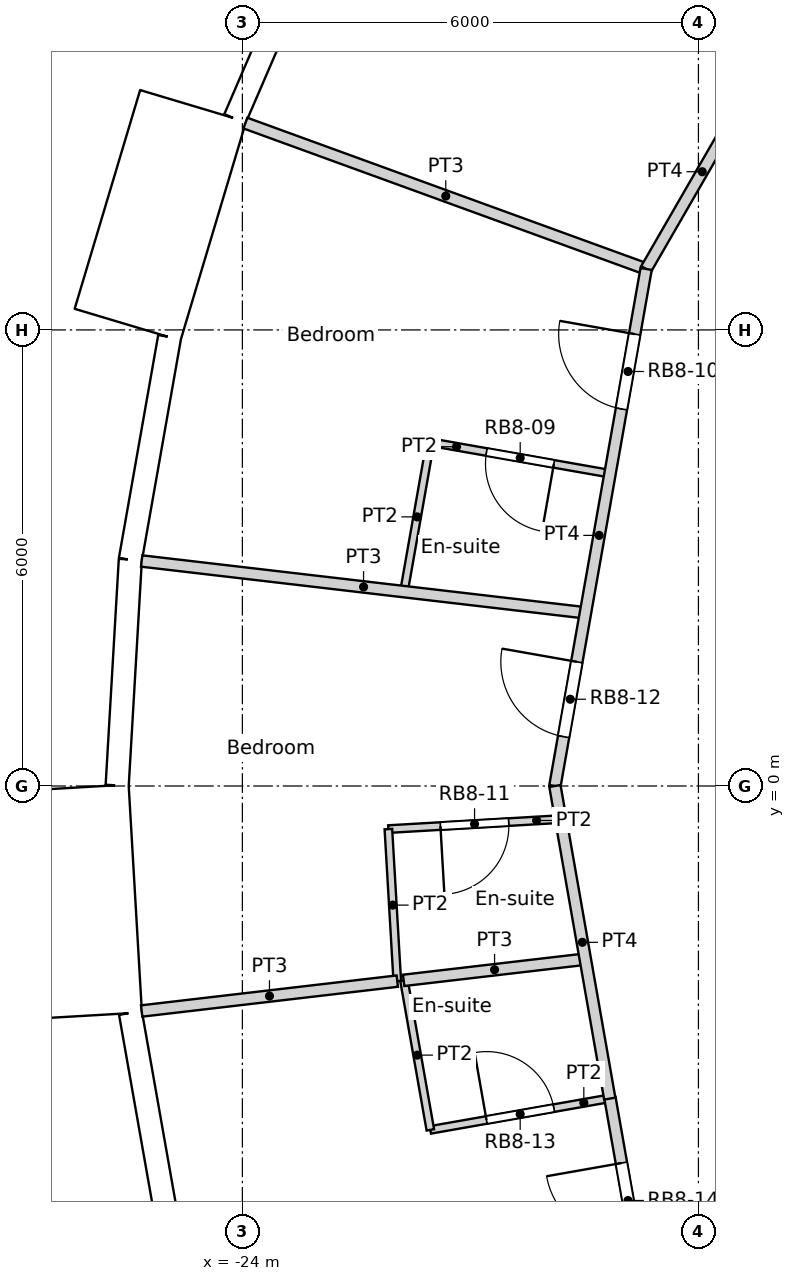
"""IFC4 building model, lengths in metres.
Left out: names, types, materials, properties, quantities, classifications, styles, units other than length and angle.
Written with IfcOpenShell. Run it as: python <this file> out.ifc"""

import sys

from ifc_helpers import new_model, si_unit, direction, frame, frame_2d, origin, origin_2d, place, context, subcontext, project, spatial, rectangle, circle, extrude, element, fill, save


model = new_model("IFC4")
c1 = context("Model", 3, precision=1e-05, world=origin(), true_north=direction((0.0, 1.0)))
c2 = subcontext(c1, "Body", "Model", "MODEL_VIEW")
j1 = project(units=[si_unit("LENGTHUNIT", "METRE"), si_unit("PLANEANGLEUNIT", "RADIAN")], contexts=[c1])
p1 = place(None, origin())
s1 = spatial("IfcSite", under=j1, at=p1, CompositionType="ELEMENT")
p2 = place(p1, origin())
s2 = spatial("IfcBuilding", under=s1, at=p2, CompositionType="ELEMENT")
p3 = place(p2, frame((0.0, 0.0, 201.6)))
s3 = spatial("IfcBuildingStorey", under=s2, at=p3, CompositionType="ELEMENT", Elevation=201.6)
for number, where, z_axis, x_axis in (
    (1, (-23.067, 8.396, 0.0), (0.0, 0.0, 1.0), (1.0, 0.0, 0.0)),
    (2, (-24.382, 2.85, 0.0), (0.0, 0.0, 1.0), (1.0, 0.0, 0.0)),
    (3, (-24.382, -2.85, 0.0), (0.0, 0.0, 1.0), (1.0, 0.0, 0.0)),
):
    element("IfcColumn", number, at=place(p3, frame(where, z_axis=z_axis, x_axis=x_axis)), inside=s3, PredefinedType="COLUMN", context=c2, shape_type="SweptSolid", body=[
        extrude(circle(Radius=0.6, at=origin_2d()), origin(), (0.0, 0.0, 1.0), 3.6),
    ])
for number, where, z_axis, x_axis in (
    (4, (-18.612, 2.805, 0.0), (0.0, 0.0, 1.0), (1.0, 0.0, 0.0)),
    (5, (-18.612, -2.805, 0.0), (0.0, 0.0, 1.0), (1.0, 0.0, 0.0)),
):
    element("IfcColumn", number, at=place(p3, frame(where, z_axis=z_axis, x_axis=x_axis)), inside=s3, PredefinedType="COLUMN", context=c2, shape_type="SweptSolid", body=[
        extrude(circle(Radius=0.65, at=origin_2d()), origin(), (0.0, 0.0, 1.0), 3.6),
    ])
p4 = place(p3, frame((-22.919, 11.51, 0.0), z_axis=(0.0, 0.0, 1.0), x_axis=(-0.396078892785, -0.918216483565, 0.0)))
e6 = element("IfcWall", 6, at=p4, inside=s3, PredefinedType="SOLIDWALL", context=c2, shape_type="SweptSolid", body=[
    extrude(rectangle(XDim=2.973, YDim=0.3, at=frame_2d((1.486, 0.0))), origin(), (0.0, 0.0, 1.0), 3.3),
])
p5 = place(p4, frame((1.486, 0.0, 1.55)))
e7 = element("IfcOpeningElement", 7, at=p5, cuts=e6, PredefinedType="OPENING", context=c2, shape_type="SweptSolid", body=[
    extrude(circle(Radius=0.9, at=origin_2d()), frame((0.0, 0.16, 0.0), z_axis=(0.0, -1.0, 0.0), x_axis=(1.0, 0.0, 0.0)), (0.0, 0.0, 1.0), 0.32),
])
p6 = place(p3, frame((-24.649, 8.945, -0.3), z_axis=(0.0, 0.0, 1.0), x_axis=(-0.286780420304, -0.957996341606, 0.0)))
e8 = element("IfcWall", 8, at=p6, inside=s3, PredefinedType="ELEMENTEDWALL", context=c2, shape_type="SweptSolid", body=[
    extrude(rectangle(XDim=3.0, YDim=1.45, at=frame_2d((1.5, 0.0))), origin(), (0.0, 0.0, 1.0), 3.6),
])
p7 = place(p6, frame((1.5, 0.0, 1.85)))
e9 = element("IfcOpeningElement", 9, at=p7, cuts=e8, PredefinedType="OPENING", context=c2, shape_type="SweptSolid", body=[
    extrude(circle(Radius=0.9, at=origin_2d()), frame((0.0, 0.735, 0.0), z_axis=(0.0, -1.0, 0.0), x_axis=(1.0, 0.0, 0.0)), (0.0, 0.0, 1.0), 1.47),
])
p8 = place(p3, frame((-24.958, 5.905, 0.0), z_axis=(0.0, 0.0, 1.0), x_axis=(-0.173686952598, -0.984800915159, 0.0)))
e10 = element("IfcWall", 10, at=p8, inside=s3, PredefinedType="SOLIDWALL", context=c2, shape_type="SweptSolid", body=[
    extrude(rectangle(XDim=2.973, YDim=0.3, at=frame_2d((1.486, 0.0))), origin(), (0.0, 0.0, 1.0), 3.3),
])
p9 = place(p8, frame((1.486, 0.0, 1.55)))
e11 = element("IfcOpeningElement", 11, at=p9, cuts=e10, PredefinedType="OPENING", context=c2, shape_type="SweptSolid", body=[
    extrude(circle(Radius=0.9, at=origin_2d()), frame((0.0, 0.16, 0.0), z_axis=(0.0, -1.0, 0.0), x_axis=(1.0, 0.0, 0.0)), (0.0, 0.0, 1.0), 0.32),
])
p10 = place(p3, frame((-25.474, 2.978, 0.0), z_axis=(0.0, 0.0, 1.0), x_axis=(-0.058139540521, -0.998308466271, 0.0)))
e12 = element("IfcWall", 12, at=p10, inside=s3, PredefinedType="SOLIDWALL", context=c2, shape_type="SweptSolid", body=[
    extrude(rectangle(XDim=2.973, YDim=0.3, at=frame_2d((1.487, 0.0))), origin(), (0.0, 0.0, 1.0), 3.3),
])
p11 = place(p10, frame((1.486, 0.0, 1.55)))
e13 = element("IfcOpeningElement", 13, at=p11, cuts=e12, PredefinedType="OPENING", context=c2, shape_type="SweptSolid", body=[
    extrude(circle(Radius=0.9, at=origin_2d()), frame((0.0, 0.16, 0.0), z_axis=(0.0, -1.0, 0.0), x_axis=(1.0, 0.0, 0.0)), (0.0, 0.0, 1.0), 0.32),
])
p12 = place(p3, frame((-26.222, -0.025, -0.3), z_axis=(0.0, 0.0, 1.0), x_axis=(0.058106596105, -0.998310384344, 0.0)))
e14 = element("IfcWall", 14, at=p12, inside=s3, PredefinedType="ELEMENTEDWALL", context=c2, shape_type="SweptSolid", body=[
    extrude(rectangle(XDim=3.0, YDim=1.45, at=frame_2d((1.5, 0.0))), origin(), (0.0, 0.0, 1.0), 3.6),
])
p13 = place(p12, frame((1.5, 0.0, 1.85)))
e15 = element("IfcOpeningElement", 15, at=p13, cuts=e14, PredefinedType="OPENING", context=c2, shape_type="SweptSolid", body=[
    extrude(circle(Radius=0.9, at=origin_2d()), frame((0.0, 0.735, 0.0), z_axis=(0.0, -1.0, 0.0), x_axis=(1.0, 0.0, 0.0)), (0.0, 0.0, 1.0), 1.47),
])
p14 = place(p3, frame((-25.472, -2.987, 0.0), z_axis=(0.0, 0.0, 1.0), x_axis=(0.173686952598, -0.984800915159, 0.0)))
e16 = element("IfcWall", 16, at=p14, inside=s3, PredefinedType="SOLIDWALL", context=c2, shape_type="SweptSolid", body=[
    extrude(rectangle(XDim=2.973, YDim=0.3, at=frame_2d((1.486, 0.0))), origin(), (0.0, 0.0, 1.0), 3.3),
])
p15 = place(p14, frame((1.486, 0.0, 1.55)))
e17 = element("IfcOpeningElement", 17, at=p15, cuts=e16, PredefinedType="OPENING", context=c2, shape_type="SweptSolid", body=[
    extrude(circle(Radius=0.9, at=origin_2d()), frame((0.0, 0.16, 0.0), z_axis=(0.0, -1.0, 0.0), x_axis=(1.0, 0.0, 0.0)), (0.0, 0.0, 1.0), 0.32),
])
p16 = place(p3, frame((-18.688, 6.802, 0.0), z_axis=(0.0, 0.0, 1.0), x_axis=(0.499914202267, 0.866074933462, 0.0)))
e18 = element("IfcWall", 18, at=p16, inside=s3, PredefinedType="PARTITIONING", context=c2, shape_type="SweptSolid", body=[
    extrude(rectangle(XDim=6.907, YDim=0.15, at=frame_2d((3.454, 0.0))), origin(), (0.0, 0.0, 1.0), 3.3),
])
p17 = place(p16, frame((3.004, 0.0, 0.0)))
e19 = element("IfcOpeningElement", 19, at=p17, cuts=e18, PredefinedType="OPENING", context=c2, shape_type="SweptSolid", body=[
    extrude(rectangle(XDim=1.8, YDim=2.1, at=frame_2d((0.9, 1.05))), frame((0.0, 0.075, 0.0), z_axis=(0.0, -1.0, 0.0), x_axis=(1.0, 0.0, 0.0)), (0.0, 0.0, 1.0), 0.15),
])
p18 = place(p3, frame((-19.888, 0.0, 0.0), z_axis=(0.0, 0.0, 1.0), x_axis=(0.173763153374, 0.984787472772, 0.0)))
e20 = element("IfcWall", 20, at=p18, inside=s3, PredefinedType="PARTITIONING", context=c2, shape_type="SweptSolid", body=[
    extrude(rectangle(XDim=6.907, YDim=0.15, at=frame_2d((3.454, 0.0))), origin(), (0.0, 0.0, 1.0), 3.3),
])
p19 = place(p18, frame((5.037, 0.0, 0.0)))
e21 = element("IfcOpeningElement", 21, at=p19, cuts=e20, PredefinedType="OPENING", context=c2, shape_type="SweptSolid", body=[
    extrude(rectangle(XDim=1.0, YDim=2.1, at=frame_2d((0.5, 1.05))), frame((0.0, 0.075, 0.0), z_axis=(0.0, -1.0, 0.0), x_axis=(1.0, 0.0, 0.0)), (0.0, 0.0, 1.0), 0.15),
])
p20 = place(p18, frame((0.659, 0.0, 0.0)))
e22 = element("IfcOpeningElement", 22, at=p20, cuts=e20, PredefinedType="OPENING", context=c2, shape_type="SweptSolid", body=[
    extrude(rectangle(XDim=1.0, YDim=2.1, at=frame_2d((0.5, 1.05))), frame((0.0, 0.075, 0.0), z_axis=(0.0, -1.0, 0.0), x_axis=(1.0, 0.0, 0.0)), (0.0, 0.0, 1.0), 0.15),
])
p21 = place(p3, frame((-19.888, 0.0, 0.0), z_axis=(0.0, 0.0, 1.0), x_axis=(0.1727845501, -0.984959643461, 0.0)))
e23 = element("IfcWall", 23, at=p21, inside=s3, PredefinedType="PARTITIONING", context=c2, shape_type="SweptSolid", body=[
    extrude(rectangle(XDim=4.175, YDim=0.15, at=frame_2d((2.088, 0.0))), origin(), (0.0, 0.0, 1.0), 3.3),
])
p22 = place(p3, frame((-19.164, -4.104, 0.0), z_axis=(0.0, 0.0, 1.0), x_axis=(0.173770083029, -0.984786250028, 0.0)))
e24 = element("IfcWall", 24, at=p22, inside=s3, PredefinedType="PARTITIONING", context=c2, shape_type="SweptSolid", body=[
    extrude(rectangle(XDim=2.74, YDim=0.15, at=frame_2d((1.37, 0.0))), origin(), (0.0, 0.0, 1.0), 3.3),
])
p23 = place(p22, frame((0.87, 0.0, 0.0)))
e25 = element("IfcOpeningElement", 25, at=p23, cuts=e24, PredefinedType="OPENING", context=c2, shape_type="SweptSolid", body=[
    extrude(rectangle(XDim=1.0, YDim=2.1, at=frame_2d((0.5, 1.05))), frame((0.0, 0.075, 0.0), z_axis=(0.0, -1.0, 0.0), x_axis=(1.0, 0.0, 0.0)), (0.0, 0.0, 1.0), 0.15),
])
p24 = place(p3, frame((-23.96, 8.721, 0.0), z_axis=(0.0, 0.0, 1.0), x_axis=(0.939686652043, -0.342036541866, 0.0)))
e26 = element("IfcWall", 26, at=p24, inside=s3, PredefinedType="PARTITIONING", context=c2, shape_type="SweptSolid", body=[
    extrude(rectangle(XDim=5.61, YDim=0.15, at=frame_2d((2.805, 0.0))), origin(), (0.0, 0.0, 1.0), 3.3),
])
p25 = place(p3, frame((-21.527, 4.524, 0.0), z_axis=(0.0, 0.0, 1.0), x_axis=(0.9848663854, -0.173315327969, 0.0)))
e27 = element("IfcWall", 27, at=p25, inside=s3, PredefinedType="PARTITIONING", context=c2, shape_type="SweptSolid", body=[
    extrude(rectangle(XDim=2.4, YDim=0.1, at=frame_2d((1.2, 0.0))), origin(), (0.0, 0.0, 1.0), 3.3),
])
p26 = place(p25, frame((0.75, 0.0, 0.0)))
e28 = element("IfcOpeningElement", 28, at=p26, cuts=e27, PredefinedType="OPENING", context=c2, shape_type="SweptSolid", body=[
    extrude(rectangle(XDim=0.9, YDim=2.04, at=frame_2d((0.45, 1.02))), frame((0.0, 0.05, 0.0), z_axis=(0.0, -1.0, 0.0), x_axis=(1.0, 0.0, 0.0)), (0.0, 0.0, 1.0), 0.1),
])
p27 = place(p3, frame((-21.874, 2.557, 0.0), z_axis=(0.0, 0.0, 1.0), x_axis=(0.17368771375, 0.984800780916, 0.0)))
e29 = element("IfcWall", 29, at=p27, inside=s3, PredefinedType="PARTITIONING", context=c2, shape_type="SweptSolid", body=[
    extrude(rectangle(XDim=1.997, YDim=0.1, at=frame_2d((0.999, 0.0))), origin(), (0.0, 0.0, 1.0), 3.3),
])
p28 = place(p3, frame((-25.325, 2.96, 0.0), z_axis=(0.0, 0.0, 1.0), x_axis=(0.993249747924, -0.115995423397, 0.0)))
e30 = element("IfcWall", 30, at=p28, inside=s3, PredefinedType="PARTITIONING", context=c2, shape_type="SweptSolid", body=[
    extrude(rectangle(XDim=5.879, YDim=0.15, at=frame_2d((2.939, 0.0))), origin(), (0.0, 0.0, 1.0), 3.3),
])
p29 = place(p3, frame((-22.079, -0.567, 0.0), z_axis=(0.0, 0.0, 1.0), x_axis=(0.998314893836, 0.058029068102, 0.0)))
e31 = element("IfcWall", 31, at=p29, inside=s3, PredefinedType="PARTITIONING", context=c2, shape_type="SweptSolid", body=[
    extrude(rectangle(XDim=2.272, YDim=0.1, at=frame_2d((1.136, 0.0))), origin(), (0.0, 0.0, 1.0), 3.3),
])
p30 = place(p29, frame((0.686, 0.0, 0.0)))
e32 = element("IfcOpeningElement", 32, at=p30, cuts=e31, PredefinedType="OPENING", context=c2, shape_type="SweptSolid", body=[
    extrude(rectangle(XDim=0.9, YDim=2.04, at=frame_2d((0.45, 1.02))), frame((0.0, 0.05, 0.0), z_axis=(0.0, -1.0, 0.0), x_axis=(1.0, 0.0, 0.0)), (0.0, 0.0, 1.0), 0.1),
])
p31 = place(p3, frame((-22.079, -0.567, 0.0), z_axis=(0.0, 0.0, 1.0), x_axis=(0.058493425416, -0.998287793766, 0.0)))
e33 = element("IfcWall", 33, at=p31, inside=s3, PredefinedType="PARTITIONING", context=c2, shape_type="SweptSolid", body=[
    extrude(rectangle(XDim=2.003, YDim=0.1, at=frame_2d((1.002, 0.0))), origin(), (0.0, 0.0, 1.0), 3.3),
])
p32 = place(p3, frame((-25.325, -2.96, 0.0), z_axis=(0.0, 0.0, 1.0), x_axis=(0.993238911344, 0.11608817766, 0.0)))
e34 = element("IfcWall", 34, at=p32, inside=s3, PredefinedType="PARTITIONING", context=c2, shape_type="SweptSolid", body=[
    extrude(rectangle(XDim=3.386, YDim=0.15, at=frame_2d((1.693, 0.0))), origin(), (0.0, 0.0, 1.0), 3.3),
])
p33 = place(p3, frame((-21.878, -2.557, 0.0), z_axis=(0.0, 0.0, 1.0), x_axis=(0.99327460921, 0.115782341913, 0.0)))
e35 = element("IfcWall", 35, at=p33, inside=s3, PredefinedType="PARTITIONING", context=c2, shape_type="SweptSolid", body=[
    extrude(rectangle(XDim=2.408, YDim=0.15, at=frame_2d((1.204, 0.0))), origin(), (0.0, 0.0, 1.0), 3.3),
])
p34 = place(p3, frame((-21.874, -2.557, 0.0), z_axis=(0.0, 0.0, 1.0), x_axis=(0.17368771375, -0.984800780916, 0.0)))
e36 = element("IfcWall", 36, at=p34, inside=s3, PredefinedType="PARTITIONING", context=c2, shape_type="SweptSolid", body=[
    extrude(rectangle(XDim=1.997, YDim=0.1, at=frame_2d((0.999, 0.0))), origin(), (0.0, 0.0, 1.0), 3.3),
])
p35 = place(p3, frame((-21.527, -4.524, 0.0), z_axis=(0.0, 0.0, 1.0), x_axis=(0.9848663854, 0.173315327969, 0.0)))
e37 = element("IfcWall", 37, at=p35, inside=s3, PredefinedType="PARTITIONING", context=c2, shape_type="SweptSolid", body=[
    extrude(rectangle(XDim=2.4, YDim=0.1, at=frame_2d((1.2, 0.0))), origin(), (0.0, 0.0, 1.0), 3.3),
])
p36 = place(p35, frame((0.75, 0.0, 0.0)))
e38 = element("IfcOpeningElement", 38, at=p36, cuts=e37, PredefinedType="OPENING", context=c2, shape_type="SweptSolid", body=[
    extrude(rectangle(XDim=0.9, YDim=2.04, at=frame_2d((0.45, 1.02))), frame((0.0, 0.05, 0.0), z_axis=(0.0, -1.0, 0.0), x_axis=(1.0, 0.0, 0.0)), (0.0, 0.0, 1.0), 0.1),
])
p37 = place(p5, origin())
e39 = element("IfcWindow", 39, at=p37, inside=s3, PartitioningType="SINGLE_PANEL", PredefinedType="WINDOW", context=c2, shape_type="SweptSolid", body=[
    extrude(circle(Radius=0.9, at=origin_2d()), frame((0.0, 0.12, 0.0), z_axis=(0.0, -1.0, 0.0), x_axis=(1.0, 0.0, 0.0)), (0.0, 0.0, 1.0), 0.1),
])
fill(e7, e39)
p38 = place(p7, origin())
e40 = element("IfcWindow", 40, at=p38, inside=s3, PartitioningType="SINGLE_PANEL", PredefinedType="WINDOW", context=c2, shape_type="SweptSolid", body=[
    extrude(circle(Radius=0.9, at=origin_2d()), frame((0.0, 0.695, 0.0), z_axis=(0.0, -1.0, 0.0), x_axis=(1.0, 0.0, 0.0)), (0.0, 0.0, 1.0), 0.1),
])
fill(e9, e40)
p39 = place(p9, origin())
e41 = element("IfcWindow", 41, at=p39, inside=s3, PartitioningType="SINGLE_PANEL", PredefinedType="WINDOW", context=c2, shape_type="SweptSolid", body=[
    extrude(circle(Radius=0.9, at=origin_2d()), frame((0.0, 0.12, 0.0), z_axis=(0.0, -1.0, 0.0), x_axis=(1.0, 0.0, 0.0)), (0.0, 0.0, 1.0), 0.1),
])
fill(e11, e41)
p40 = place(p11, origin())
e42 = element("IfcWindow", 42, at=p40, inside=s3, PartitioningType="SINGLE_PANEL", PredefinedType="WINDOW", context=c2, shape_type="SweptSolid", body=[
    extrude(circle(Radius=0.9, at=origin_2d()), frame((0.0, 0.12, 0.0), z_axis=(0.0, -1.0, 0.0), x_axis=(1.0, 0.0, 0.0)), (0.0, 0.0, 1.0), 0.1),
])
fill(e13, e42)
p41 = place(p13, origin())
e43 = element("IfcWindow", 43, at=p41, inside=s3, PartitioningType="SINGLE_PANEL", PredefinedType="WINDOW", context=c2, shape_type="SweptSolid", body=[
    extrude(circle(Radius=0.9, at=origin_2d()), frame((0.0, 0.695, 0.0), z_axis=(0.0, -1.0, 0.0), x_axis=(1.0, 0.0, 0.0)), (0.0, 0.0, 1.0), 0.1),
])
fill(e15, e43)
p42 = place(p15, origin())
e44 = element("IfcWindow", 44, at=p42, inside=s3, PartitioningType="SINGLE_PANEL", PredefinedType="WINDOW", context=c2, shape_type="SweptSolid", body=[
    extrude(circle(Radius=0.9, at=origin_2d()), frame((0.0, 0.12, 0.0), z_axis=(0.0, -1.0, 0.0), x_axis=(1.0, 0.0, 0.0)), (0.0, 0.0, 1.0), 0.1),
])
fill(e17, e44)
p43 = place(p26, origin())
e45 = element("IfcDoor", 45, at=p43, inside=s3, OperationType="SINGLE_SWING_LEFT", PredefinedType="DOOR", context=c2, shape_type="SweptSolid", body=[
    extrude(rectangle(XDim=0.9, YDim=2.04, at=frame_2d((0.45, 1.02))), frame((0.0, 0.025, 0.0), z_axis=(0.0, -1.0, 0.0), x_axis=(1.0, 0.0, 0.0)), (0.0, 0.0, 1.0), 0.05),
])
fill(e28, e45)
p44 = place(p19, origin())
e46 = element("IfcDoor", 46, at=p44, inside=s3, OperationType="SINGLE_SWING_RIGHT", PredefinedType="DOOR", context=c2, shape_type="SweptSolid", body=[
    extrude(rectangle(XDim=1.0, YDim=2.1, at=frame_2d((0.5, 1.05))), frame((0.0, 0.025, 0.0), z_axis=(0.0, -1.0, 0.0), x_axis=(1.0, 0.0, 0.0)), (0.0, 0.0, 1.0), 0.05),
])
fill(e21, e46)
p45 = place(p30, origin())
e47 = element("IfcDoor", 47, at=p45, inside=s3, OperationType="SINGLE_SWING_RIGHT", PredefinedType="DOOR", context=c2, shape_type="SweptSolid", body=[
    extrude(rectangle(XDim=0.9, YDim=2.04, at=frame_2d((0.45, 1.02))), frame((0.0, 0.025, 0.0), z_axis=(0.0, -1.0, 0.0), x_axis=(1.0, 0.0, 0.0)), (0.0, 0.0, 1.0), 0.05),
])
fill(e32, e47)
p46 = place(p20, origin())
e48 = element("IfcDoor", 48, at=p46, inside=s3, OperationType="SINGLE_SWING_RIGHT", PredefinedType="DOOR", context=c2, shape_type="SweptSolid", body=[
    extrude(rectangle(XDim=1.0, YDim=2.1, at=frame_2d((0.5, 1.05))), frame((0.0, 0.025, 0.0), z_axis=(0.0, -1.0, 0.0), x_axis=(1.0, 0.0, 0.0)), (0.0, 0.0, 1.0), 0.05),
])
fill(e22, e48)
p47 = place(p36, origin())
e49 = element("IfcDoor", 49, at=p47, inside=s3, OperationType="SINGLE_SWING_LEFT", PredefinedType="DOOR", context=c2, shape_type="SweptSolid", body=[
    extrude(rectangle(XDim=0.9, YDim=2.04, at=frame_2d((0.45, 1.02))), frame((0.0, 0.025, 0.0), z_axis=(0.0, -1.0, 0.0), x_axis=(1.0, 0.0, 0.0)), (0.0, 0.0, 1.0), 0.05),
])
fill(e38, e49)
p48 = place(p23, origin())
e50 = element("IfcDoor", 50, at=p48, inside=s3, OperationType="SINGLE_SWING_RIGHT", PredefinedType="DOOR", context=c2, shape_type="SweptSolid", body=[
    extrude(rectangle(XDim=1.0, YDim=2.1, at=frame_2d((0.5, 1.05))), frame((0.0, 0.025, 0.0), z_axis=(0.0, -1.0, 0.0), x_axis=(1.0, 0.0, 0.0)), (0.0, 0.0, 1.0), 0.05),
])
fill(e25, e50)
save(model, sys.argv[1])
